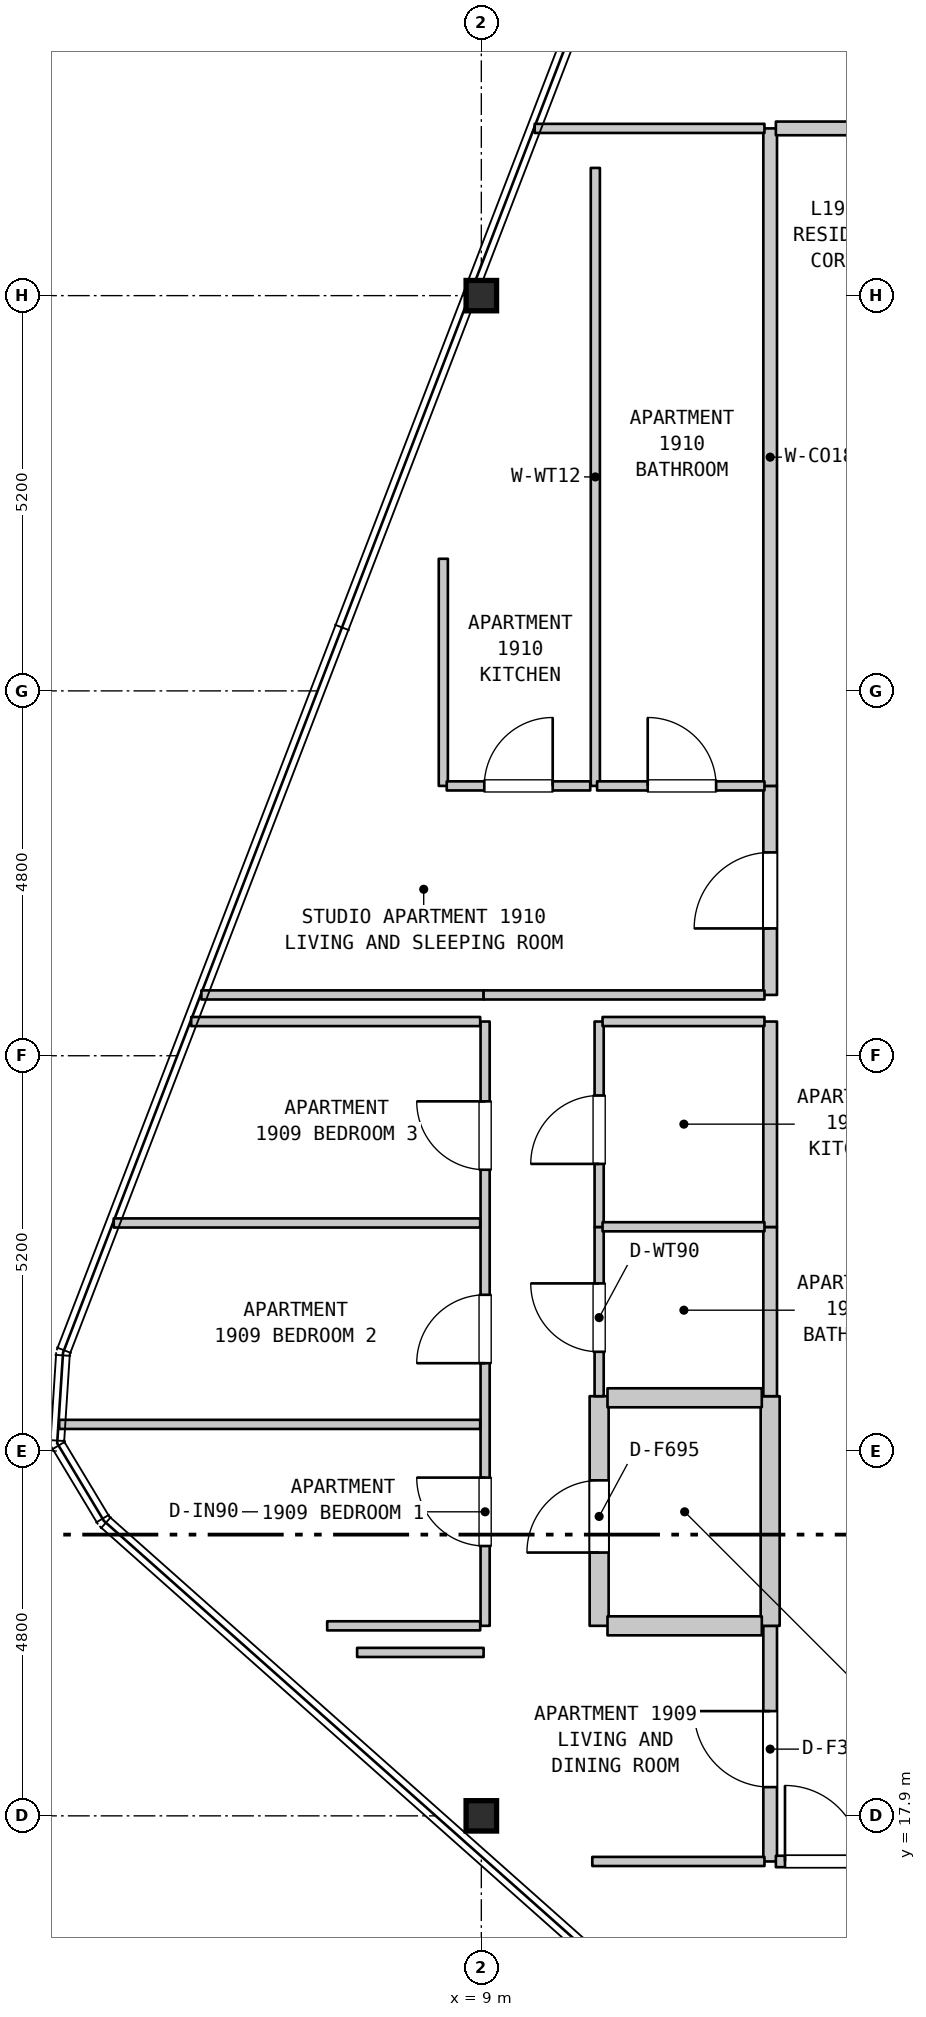
"""IFC4 building model, lengths in metres.
Left out: names, types, materials, properties, quantities, classifications, styles, units other than length and angle.
Written with IfcOpenShell. Run it as: python <this file> out.ifc"""

import sys

from ifc_helpers import new_model, si_unit, direction, frame, frame_2d, origin, origin_2d, place, context, subcontext, project, spatial, rectangle, i_section, extrude, element, fill, save


model = new_model("IFC4")
c1 = context("Model", 3, precision=1e-05, world=origin(), true_north=direction((0.0, 1.0)))
c2 = subcontext(c1, "Body", "Model", "MODEL_VIEW")
j1 = project(units=[si_unit("LENGTHUNIT", "METRE"), si_unit("PLANEANGLEUNIT", "RADIAN")], contexts=[c1])
p1 = place(None, origin())
s1 = spatial("IfcSite", under=j1, at=p1, CompositionType="ELEMENT")
p2 = place(p1, origin())
s2 = spatial("IfcBuilding", under=s1, at=p2, CompositionType="ELEMENT")
p3 = place(p2, frame((0.0, 0.0, 81.2)))
s3 = spatial("IfcBuildingStorey", under=s2, at=p3, CompositionType="ELEMENT", Elevation=81.2)
for number, where, z_axis, x_axis in (
    (1, (9.0, 17.9, 0.0), (0.0, 0.0, 1.0), (1.0, 0.0, 0.0)),
    (2, (9.0, 37.9, 0.0), (0.0, 0.0, 1.0), (1.0, 0.0, 0.0)),
):
    element("IfcColumn", number, at=place(p3, frame(where, z_axis=z_axis, x_axis=x_axis)), inside=s3, PredefinedType="COLUMN", context=c2, shape_type="SweptSolid", body=[
        extrude(i_section(OverallWidth=0.401, OverallDepth=0.399, WebThickness=0.025, FlangeThickness=0.04, FilletRadius=0.015, at=origin_2d()), origin(), (0.0, 0.0, 1.0), 5.2),
    ])
p4 = place(p3, frame((8.5, 31.45, 0.0), z_axis=(0.0, 0.0, 1.0), x_axis=(0.0, 1.0, 0.0)))
e3 = element("IfcWall", 3, at=p4, inside=s3, PredefinedType="PARTITIONING", context=c2, shape_type="SweptSolid", body=[
    extrude(rectangle(XDim=2.988, YDim=0.12, at=frame_2d((1.494, 0.0))), origin(), (0.0, 0.0, 1.0), 4.885),
])
p5 = place(p3, frame((9.05, 20.4, 0.0), z_axis=(0.0, 0.0, 1.0), x_axis=(0.0, 1.0, 0.0)))
e4 = element("IfcWall", 4, at=p5, inside=s3, PredefinedType="PARTITIONING", context=c2, shape_type="SweptSolid", body=[
    extrude(rectangle(XDim=7.95, YDim=0.12, at=frame_2d((3.975, 0.0))), origin(), (0.0, 0.0, 1.0), 4.285),
])
p6 = place(p5, frame((1.05, 0.0, 0.0)))
e5 = element("IfcOpeningElement", 5, at=p6, cuts=e4, PredefinedType="OPENING", context=c2, shape_type="SweptSolid", body=[
    extrude(rectangle(XDim=0.9, YDim=2.15, at=frame_2d((0.45, 1.075))), frame((0.0, 0.07, 0.0), z_axis=(0.0, -1.0, 0.0), x_axis=(1.0, 0.0, 0.0)), (0.0, 0.0, 1.0), 0.14),
])
p7 = place(p5, frame((3.455, 0.0, 0.0)))
e6 = element("IfcOpeningElement", 6, at=p7, cuts=e4, PredefinedType="OPENING", context=c2, shape_type="SweptSolid", body=[
    extrude(rectangle(XDim=0.9, YDim=2.15, at=frame_2d((0.45, 1.075))), frame((0.0, 0.07, 0.0), z_axis=(0.0, -1.0, 0.0), x_axis=(1.0, 0.0, 0.0)), (0.0, 0.0, 1.0), 0.14),
])
p8 = place(p5, frame((6.0, 0.0, 0.0)))
e7 = element("IfcOpeningElement", 7, at=p8, cuts=e4, PredefinedType="OPENING", context=c2, shape_type="SweptSolid", body=[
    extrude(rectangle(XDim=0.9, YDim=2.15, at=frame_2d((0.45, 1.075))), frame((0.0, 0.07, 0.0), z_axis=(0.0, -1.0, 0.0), x_axis=(1.0, 0.0, 0.0)), (0.0, 0.0, 1.0), 0.14),
])
p9 = place(p3, frame((10.5, 31.45, 0.0), z_axis=(0.0, 0.0, 1.0), x_axis=(0.0, 1.0, 0.0)))
e8 = element("IfcWall", 8, at=p9, inside=s3, PredefinedType="PARTITIONING", context=c2, shape_type="SweptSolid", body=[
    extrude(rectangle(XDim=8.13, YDim=0.12, at=frame_2d((4.065, 0.0))), origin(), (0.0, 0.0, 1.0), 4.885),
])
p10 = place(p3, frame((10.55, 20.4, 0.0), z_axis=(0.0, 0.0, 1.0), x_axis=(0.0, 1.0, 0.0)))
e9 = element("IfcWall", 9, at=p10, inside=s3, PredefinedType="STANDARD", context=c2, shape_type="SweptSolid", body=[
    extrude(rectangle(XDim=3.021, YDim=0.25, at=frame_2d((1.51, 0.0))), origin(), (0.0, 0.0, 1.0), 4.885),
])
p11 = place(p10, frame((0.964, 0.0, 0.0)))
e10 = element("IfcOpeningElement", 10, at=p11, cuts=e9, PredefinedType="OPENING", context=c2, shape_type="SweptSolid", body=[
    extrude(rectangle(XDim=0.95, YDim=2.15, at=frame_2d((0.475, 1.075))), frame((0.0, 0.135, 0.0), z_axis=(0.0, -1.0, 0.0), x_axis=(1.0, 0.0, 0.0)), (0.0, 0.0, 1.0), 0.27),
])
p12 = place(p3, frame((10.55, 23.421, 0.0), z_axis=(0.0, 0.0, 1.0), x_axis=(0.0, 1.0, 0.0)))
e11 = element("IfcWall", 11, at=p12, inside=s3, PredefinedType="PARTITIONING", context=c2, shape_type="SweptSolid", body=[
    extrude(rectangle(XDim=2.226, YDim=0.12, at=frame_2d((1.113, 0.0))), origin(), (0.0, 0.0, 1.0), 4.885),
])
p13 = place(p12, frame((0.584, 0.0, 0.0)))
e12 = element("IfcOpeningElement", 12, at=p13, cuts=e11, PredefinedType="OPENING", context=c2, shape_type="SweptSolid", body=[
    extrude(rectangle(XDim=0.9, YDim=2.1, at=frame_2d((0.45, 1.05))), frame((0.0, 0.07, 0.0), z_axis=(0.0, -1.0, 0.0), x_axis=(1.0, 0.0, 0.0)), (0.0, 0.0, 1.0), 0.14),
])
p14 = place(p3, frame((10.55, 25.647, 0.0), z_axis=(0.0, 0.0, 1.0), x_axis=(0.0, 1.0, 0.0)))
e13 = element("IfcWall", 13, at=p14, inside=s3, PredefinedType="PARTITIONING", context=c2, shape_type="SweptSolid", body=[
    extrude(rectangle(XDim=2.703, YDim=0.12, at=frame_2d((1.352, 0.0))), origin(), (0.0, 0.0, 1.0), 4.885),
])
p15 = place(p14, frame((0.83, 0.0, 0.0)))
e14 = element("IfcOpeningElement", 14, at=p15, cuts=e13, PredefinedType="OPENING", context=c2, shape_type="SweptSolid", body=[
    extrude(rectangle(XDim=0.9, YDim=2.15, at=frame_2d((0.45, 1.075))), frame((0.0, 0.07, 0.0), z_axis=(0.0, -1.0, 0.0), x_axis=(1.0, 0.0, 0.0)), (0.0, 0.0, 1.0), 0.14),
])
p16 = place(p3, frame((12.8, 17.3, 0.0), z_axis=(0.0, 0.0, 1.0), x_axis=(0.0, 1.0, 0.0)))
e15 = element("IfcWall", 15, at=p16, inside=s3, PredefinedType="STANDARD", context=c2, shape_type="SweptSolid", body=[
    extrude(rectangle(XDim=3.1, YDim=0.18, at=frame_2d((1.55, 0.0))), origin(), (0.0, 0.0, 1.0), 4.885),
])
p17 = place(p16, frame((0.978, 0.0, 0.0)))
e16 = element("IfcOpeningElement", 16, at=p17, cuts=e15, PredefinedType="OPENING", context=c2, shape_type="SweptSolid", body=[
    extrude(rectangle(XDim=1.0, YDim=2.15, at=frame_2d((0.5, 1.075))), frame((0.0, 0.1, 0.0), z_axis=(0.0, -1.0, 0.0), x_axis=(1.0, 0.0, 0.0)), (0.0, 0.0, 1.0), 0.2),
])
p18 = place(p3, frame((12.8, 20.4, 0.0), z_axis=(0.0, 0.0, 1.0), x_axis=(0.0, 1.0, 0.0)))
e17 = element("IfcWall", 17, at=p18, inside=s3, PredefinedType="STANDARD", context=c2, shape_type="SweptSolid", body=[
    extrude(rectangle(XDim=3.021, YDim=0.25, at=frame_2d((1.51, 0.0))), origin(), (0.0, 0.0, 1.0), 4.885),
])
p19 = place(p3, frame((12.8, 23.421, 0.0), z_axis=(0.0, 0.0, 1.0), x_axis=(0.0, 1.0, 0.0)))
e18 = element("IfcWall", 18, at=p19, inside=s3, PredefinedType="STANDARD", context=c2, shape_type="SweptSolid", body=[
    extrude(rectangle(XDim=2.226, YDim=0.18, at=frame_2d((1.113, 0.0))), origin(), (0.0, 0.0, 1.0), 4.885),
])
p20 = place(p3, frame((12.8, 25.647, 0.0), z_axis=(0.0, 0.0, 1.0), x_axis=(0.0, 1.0, 0.0)))
e19 = element("IfcWall", 19, at=p20, inside=s3, PredefinedType="STANDARD", context=c2, shape_type="SweptSolid", body=[
    extrude(rectangle(XDim=2.703, YDim=0.18, at=frame_2d((1.352, 0.0))), origin(), (0.0, 0.0, 1.0), 4.885),
])
p21 = place(p3, frame((12.8, 28.7, 0.0), z_axis=(0.0, 0.0, 1.0), x_axis=(0.0, 1.0, 0.0)))
e20 = element("IfcWall", 20, at=p21, inside=s3, PredefinedType="STANDARD", context=c2, shape_type="SweptSolid", body=[
    extrude(rectangle(XDim=2.75, YDim=0.18, at=frame_2d((1.375, 0.0))), origin(), (0.0, 0.0, 1.0), 4.885),
])
p22 = place(p21, frame((0.875, 0.0, 0.0)))
e21 = element("IfcOpeningElement", 21, at=p22, cuts=e20, PredefinedType="OPENING", context=c2, shape_type="SweptSolid", body=[
    extrude(rectangle(XDim=1.0, YDim=2.15, at=frame_2d((0.5, 1.075))), frame((0.0, 0.1, 0.0), z_axis=(0.0, -1.0, 0.0), x_axis=(1.0, 0.0, 0.0)), (0.0, 0.0, 1.0), 0.2),
])
p23 = place(p3, frame((12.8, 31.45, 0.0), z_axis=(0.0, 0.0, 1.0), x_axis=(0.0, 1.0, 0.0)))
e22 = element("IfcWall", 22, at=p23, inside=s3, PredefinedType="STANDARD", context=c2, shape_type="SweptSolid", body=[
    extrude(rectangle(XDim=8.65, YDim=0.18, at=frame_2d((4.325, 0.0))), origin(), (0.0, 0.0, 1.0), 4.885),
])
p24 = place(p3, frame((10.46, 17.3, 0.0), z_axis=(0.0, 0.0, 1.0), x_axis=(1.0, 0.0, 0.0)))
e23 = element("IfcWall", 23, at=p24, inside=s3, PredefinedType="PARTITIONING", context=c2, shape_type="SweptSolid", body=[
    extrude(rectangle(XDim=2.265, YDim=0.12, at=frame_2d((1.133, 0.0))), origin(), (0.0, 0.0, 1.0), 4.885),
])
p25 = place(p3, frame((12.875, 17.3, 0.0), z_axis=(0.0, 0.0, 1.0), x_axis=(1.0, 0.0, 0.0)))
e24 = element("IfcWall", 24, at=p25, inside=s3, PredefinedType="STANDARD", context=c2, shape_type="SweptSolid", body=[
    extrude(rectangle(XDim=3.78, YDim=0.15, at=frame_2d((1.89, 0.0))), origin(), (0.0, 0.0, 1.0), 4.885),
])
p26 = place(p25, frame((0.12, 0.0, 0.0)))
e25 = element("IfcOpeningElement", 25, at=p26, cuts=e24, PredefinedType="OPENING", context=c2, shape_type="SweptSolid", body=[
    extrude(rectangle(XDim=1.0, YDim=2.15, at=frame_2d((0.5, 1.075))), frame((0.0, 0.085, 0.0), z_axis=(0.0, -1.0, 0.0), x_axis=(1.0, 0.0, 0.0)), (0.0, 0.0, 1.0), 0.17),
])
p27 = place(p3, frame((7.366, 20.05, 0.0), z_axis=(0.0, 0.0, 1.0), x_axis=(1.0, 0.0, 0.0)))
e26 = element("IfcWall", 26, at=p27, inside=s3, PredefinedType="PARTITIONING", context=c2, shape_type="SweptSolid", body=[
    extrude(rectangle(XDim=1.664, YDim=0.12, at=frame_2d((0.832, 0.0))), origin(), (0.0, 0.0, 1.0), 4.885),
])
p28 = place(p3, frame((6.972, 20.4, 0.0), z_axis=(0.0, 0.0, 1.0), x_axis=(1.0, 0.0, 0.0)))
e27 = element("IfcWall", 27, at=p28, inside=s3, PredefinedType="PARTITIONING", context=c2, shape_type="SweptSolid", body=[
    extrude(rectangle(XDim=2.013, YDim=0.12, at=frame_2d((1.007, 0.0))), origin(), (0.0, 0.0, 1.0), 4.885),
])
p29 = place(p3, frame((10.66, 20.4, 0.0), z_axis=(0.0, 0.0, 1.0), x_axis=(1.0, 0.0, 0.0)))
e28 = element("IfcWall", 28, at=p29, inside=s3, PredefinedType="STANDARD", context=c2, shape_type="SweptSolid", body=[
    extrude(rectangle(XDim=2.03, YDim=0.25, at=frame_2d((1.015, 0.0))), origin(), (0.0, 0.0, 1.0), 4.885),
])
p30 = place(p3, frame((3.446, 23.05, 0.0), z_axis=(0.0, 0.0, 1.0), x_axis=(1.0, 0.0, 0.0)))
e29 = element("IfcWall", 29, at=p30, inside=s3, PredefinedType="PARTITIONING", context=c2, shape_type="SweptSolid", body=[
    extrude(rectangle(XDim=5.539, YDim=0.12, at=frame_2d((2.77, 0.0))), origin(), (0.0, 0.0, 1.0), 4.885),
])
p31 = place(p3, frame((10.66, 23.4, 0.0), z_axis=(0.0, 0.0, 1.0), x_axis=(1.0, 0.0, 0.0)))
e30 = element("IfcWall", 30, at=p31, inside=s3, PredefinedType="STANDARD", context=c2, shape_type="SweptSolid", body=[
    extrude(rectangle(XDim=2.03, YDim=0.25, at=frame_2d((1.015, 0.0))), origin(), (0.0, 0.0, 1.0), 4.885),
])
p32 = place(p3, frame((10.595, 25.65, 0.0), z_axis=(0.0, 0.0, 1.0), x_axis=(1.0, 0.0, 0.0)))
e31 = element("IfcWall", 31, at=p32, inside=s3, PredefinedType="PARTITIONING", context=c2, shape_type="SweptSolid", body=[
    extrude(rectangle(XDim=2.13, YDim=0.12, at=frame_2d((1.065, 0.0))), origin(), (0.0, 0.0, 1.0), 4.885),
])
p33 = place(p3, frame((4.164, 25.7, 0.0), z_axis=(0.0, 0.0, 1.0), x_axis=(1.0, 0.0, 0.0)))
e32 = element("IfcWall", 32, at=p33, inside=s3, PredefinedType="PARTITIONING", context=c2, shape_type="SweptSolid", body=[
    extrude(rectangle(XDim=4.821, YDim=0.12, at=frame_2d((2.411, 0.0))), origin(), (0.0, 0.0, 1.0), 4.885),
])
p34 = place(p3, frame((5.183, 28.35, 0.0), z_axis=(0.0, 0.0, 1.0), x_axis=(1.0, 0.0, 0.0)))
e33 = element("IfcWall", 33, at=p34, inside=s3, PredefinedType="PARTITIONING", context=c2, shape_type="SweptSolid", body=[
    extrude(rectangle(XDim=3.802, YDim=0.12, at=frame_2d((1.901, 0.0))), origin(), (0.0, 0.0, 1.0), 4.885),
])
p35 = place(p3, frame((10.595, 28.35, 0.0), z_axis=(0.0, 0.0, 1.0), x_axis=(1.0, 0.0, 0.0)))
e34 = element("IfcWall", 34, at=p35, inside=s3, PredefinedType="PARTITIONING", context=c2, shape_type="SweptSolid", body=[
    extrude(rectangle(XDim=2.13, YDim=0.12, at=frame_2d((1.065, 0.0))), origin(), (0.0, 0.0, 1.0), 4.885),
])
p36 = place(p3, frame((5.317, 28.7, 0.0), z_axis=(0.0, 0.0, 1.0), x_axis=(1.0, 0.0, 0.0)))
e35 = element("IfcWall", 35, at=p36, inside=s3, PredefinedType="PARTITIONING", context=c2, shape_type="SweptSolid", body=[
    extrude(rectangle(XDim=3.713, YDim=0.12, at=frame_2d((1.856, 0.0))), origin(), (0.0, 0.0, 1.0), 4.885),
])
p37 = place(p3, frame((9.03, 28.7, 0.0), z_axis=(0.0, 0.0, 1.0), x_axis=(1.0, 0.0, 0.0)))
e36 = element("IfcWall", 36, at=p37, inside=s3, PredefinedType="PARTITIONING", context=c2, shape_type="SweptSolid", body=[
    extrude(rectangle(XDim=3.695, YDim=0.12, at=frame_2d((1.848, 0.0))), origin(), (0.0, 0.0, 1.0), 4.885),
])
p38 = place(p3, frame((8.545, 31.45, 0.0), z_axis=(0.0, 0.0, 1.0), x_axis=(1.0, 0.0, 0.0)))
e37 = element("IfcWall", 37, at=p38, inside=s3, PredefinedType="PARTITIONING", context=c2, shape_type="SweptSolid", body=[
    extrude(rectangle(XDim=1.888, YDim=0.12, at=frame_2d((0.944, 0.0))), origin(), (0.0, 0.0, 1.0), 4.885),
])
p39 = place(p38, frame((0.494, 0.0, 0.0)))
e38 = element("IfcOpeningElement", 38, at=p39, cuts=e37, PredefinedType="OPENING", context=c2, shape_type="SweptSolid", body=[
    extrude(rectangle(XDim=0.9, YDim=2.15, at=frame_2d((0.45, 1.075))), frame((0.0, 0.07, 0.0), z_axis=(0.0, -1.0, 0.0), x_axis=(1.0, 0.0, 0.0)), (0.0, 0.0, 1.0), 0.14),
])
p40 = place(p3, frame((10.523, 31.45, 0.0), z_axis=(0.0, 0.0, 1.0), x_axis=(1.0, 0.0, 0.0)))
e39 = element("IfcWall", 39, at=p40, inside=s3, PredefinedType="PARTITIONING", context=c2, shape_type="SweptSolid", body=[
    extrude(rectangle(XDim=2.202, YDim=0.12, at=frame_2d((1.101, 0.0))), origin(), (0.0, 0.0, 1.0), 4.885),
])
p41 = place(p40, frame((0.666, 0.0, 0.0)))
e40 = element("IfcOpeningElement", 40, at=p41, cuts=e39, PredefinedType="OPENING", context=c2, shape_type="SweptSolid", body=[
    extrude(rectangle(XDim=0.9, YDim=2.1, at=frame_2d((0.45, 1.05))), frame((0.0, 0.07, 0.0), z_axis=(0.0, -1.0, 0.0), x_axis=(1.0, 0.0, 0.0)), (0.0, 0.0, 1.0), 0.14),
])
p42 = place(p3, frame((9.702, 40.1, 0.0), z_axis=(0.0, 0.0, 1.0), x_axis=(1.0, 0.0, 0.0)))
e41 = element("IfcWall", 41, at=p42, inside=s3, PredefinedType="PARTITIONING", context=c2, shape_type="SweptSolid", body=[
    extrude(rectangle(XDim=3.023, YDim=0.12, at=frame_2d((1.512, 0.0))), origin(), (0.0, 0.0, 1.0), 4.885),
])
p43 = place(p3, frame((12.875, 40.1, 0.0), z_axis=(0.0, 0.0, 1.0), x_axis=(1.0, 0.0, 0.0)))
e42 = element("IfcWall", 42, at=p43, inside=s3, PredefinedType="STANDARD", context=c2, shape_type="SweptSolid", body=[
    extrude(rectangle(XDim=3.9, YDim=0.18, at=frame_2d((1.95, 0.0))), origin(), (0.0, 0.0, 1.0), 4.885),
])
p44 = place(p43, frame((1.361, 0.0, 0.0)))
e43 = element("IfcOpeningElement", 43, at=p44, cuts=e42, PredefinedType="OPENING", context=c2, shape_type="SweptSolid", body=[
    extrude(rectangle(XDim=1.0, YDim=2.15, at=frame_2d((0.5, 1.075))), frame((0.0, 0.1, 0.0), z_axis=(0.0, -1.0, 0.0), x_axis=(1.0, 0.0, 0.0)), (0.0, 0.0, 1.0), 0.2),
])
p45 = place(p6, origin())
e44 = element("IfcDoor", 44, at=p45, inside=s3, OperationType="SINGLE_SWING_RIGHT", PredefinedType="DOOR", context=c2, shape_type="SweptSolid", body=[
    extrude(rectangle(XDim=0.9, YDim=2.15, at=frame_2d((0.45, 1.075))), frame((0.0, 0.025, 0.0), z_axis=(0.0, -1.0, 0.0), x_axis=(1.0, 0.0, 0.0)), (0.0, 0.0, 1.0), 0.05),
])
fill(e5, e44)
p46 = place(p7, origin())
e45 = element("IfcDoor", 45, at=p46, inside=s3, OperationType="SINGLE_SWING_LEFT", PredefinedType="DOOR", context=c2, shape_type="SweptSolid", body=[
    extrude(rectangle(XDim=0.9, YDim=2.15, at=frame_2d((0.45, 1.075))), frame((0.0, 0.025, 0.0), z_axis=(0.0, -1.0, 0.0), x_axis=(1.0, 0.0, 0.0)), (0.0, 0.0, 1.0), 0.05),
])
fill(e6, e45)
p47 = place(p8, origin())
e46 = element("IfcDoor", 46, at=p47, inside=s3, OperationType="SINGLE_SWING_RIGHT", PredefinedType="DOOR", context=c2, shape_type="SweptSolid", body=[
    extrude(rectangle(XDim=0.9, YDim=2.15, at=frame_2d((0.45, 1.075))), frame((0.0, 0.025, 0.0), z_axis=(0.0, -1.0, 0.0), x_axis=(1.0, 0.0, 0.0)), (0.0, 0.0, 1.0), 0.05),
])
fill(e7, e46)
p48 = place(p11, origin())
e47 = element("IfcDoor", 47, at=p48, inside=s3, OperationType="SINGLE_SWING_LEFT", PredefinedType="DOOR", context=c2, shape_type="SweptSolid", body=[
    extrude(rectangle(XDim=0.95, YDim=2.15, at=frame_2d((0.475, 1.075))), frame((0.0, 0.025, 0.0), z_axis=(0.0, -1.0, 0.0), x_axis=(1.0, 0.0, 0.0)), (0.0, 0.0, 1.0), 0.05),
])
fill(e10, e47)
p49 = place(p13, origin())
e48 = element("IfcDoor", 48, at=p49, inside=s3, OperationType="SINGLE_SWING_RIGHT", PredefinedType="DOOR", context=c2, shape_type="SweptSolid", body=[
    extrude(rectangle(XDim=0.9, YDim=2.1, at=frame_2d((0.45, 1.05))), frame((0.0, 0.025, 0.0), z_axis=(0.0, -1.0, 0.0), x_axis=(1.0, 0.0, 0.0)), (0.0, 0.0, 1.0), 0.05),
])
fill(e12, e48)
p50 = place(p15, origin())
e49 = element("IfcDoor", 49, at=p50, inside=s3, OperationType="SINGLE_SWING_LEFT", PredefinedType="DOOR", context=c2, shape_type="SweptSolid", body=[
    extrude(rectangle(XDim=0.9, YDim=2.15, at=frame_2d((0.45, 1.075))), frame((0.0, 0.025, 0.0), z_axis=(0.0, -1.0, 0.0), x_axis=(1.0, 0.0, 0.0)), (0.0, 0.0, 1.0), 0.05),
])
fill(e14, e49)
p51 = place(p17, origin())
e50 = element("IfcDoor", 50, at=p51, inside=s3, OperationType="SINGLE_SWING_RIGHT", PredefinedType="DOOR", context=c2, shape_type="SweptSolid", body=[
    extrude(rectangle(XDim=1.0, YDim=2.15, at=frame_2d((0.5, 1.075))), frame((0.0, 0.025, 0.0), z_axis=(0.0, -1.0, 0.0), x_axis=(1.0, 0.0, 0.0)), (0.0, 0.0, 1.0), 0.05),
])
fill(e16, e50)
p52 = place(p22, origin())
e51 = element("IfcDoor", 51, at=p52, inside=s3, OperationType="SINGLE_SWING_LEFT", PredefinedType="DOOR", context=c2, shape_type="SweptSolid", body=[
    extrude(rectangle(XDim=1.0, YDim=2.15, at=frame_2d((0.5, 1.075))), frame((0.0, 0.025, 0.0), z_axis=(0.0, -1.0, 0.0), x_axis=(1.0, 0.0, 0.0)), (0.0, 0.0, 1.0), 0.05),
])
fill(e21, e51)
p53 = place(p26, origin())
e52 = element("IfcDoor", 52, at=p53, inside=s3, OperationType="SINGLE_SWING_LEFT", PredefinedType="DOOR", context=c2, shape_type="SweptSolid", body=[
    extrude(rectangle(XDim=1.0, YDim=2.15, at=frame_2d((0.5, 1.075))), frame((0.0, 0.025, 0.0), z_axis=(0.0, -1.0, 0.0), x_axis=(1.0, 0.0, 0.0)), (0.0, 0.0, 1.0), 0.05),
])
fill(e25, e52)
p54 = place(p39, origin())
e53 = element("IfcDoor", 53, at=p54, inside=s3, OperationType="SINGLE_SWING_RIGHT", PredefinedType="DOOR", context=c2, shape_type="SweptSolid", body=[
    extrude(rectangle(XDim=0.9, YDim=2.15, at=frame_2d((0.45, 1.075))), frame((0.0, 0.025, 0.0), z_axis=(0.0, -1.0, 0.0), x_axis=(1.0, 0.0, 0.0)), (0.0, 0.0, 1.0), 0.05),
])
fill(e38, e53)
p55 = place(p41, origin())
e54 = element("IfcDoor", 54, at=p55, inside=s3, OperationType="SINGLE_SWING_LEFT", PredefinedType="DOOR", context=c2, shape_type="SweptSolid", body=[
    extrude(rectangle(XDim=0.9, YDim=2.1, at=frame_2d((0.45, 1.05))), frame((0.0, 0.025, 0.0), z_axis=(0.0, -1.0, 0.0), x_axis=(1.0, 0.0, 0.0)), (0.0, 0.0, 1.0), 0.05),
])
fill(e40, e54)
save(model, sys.argv[1])
